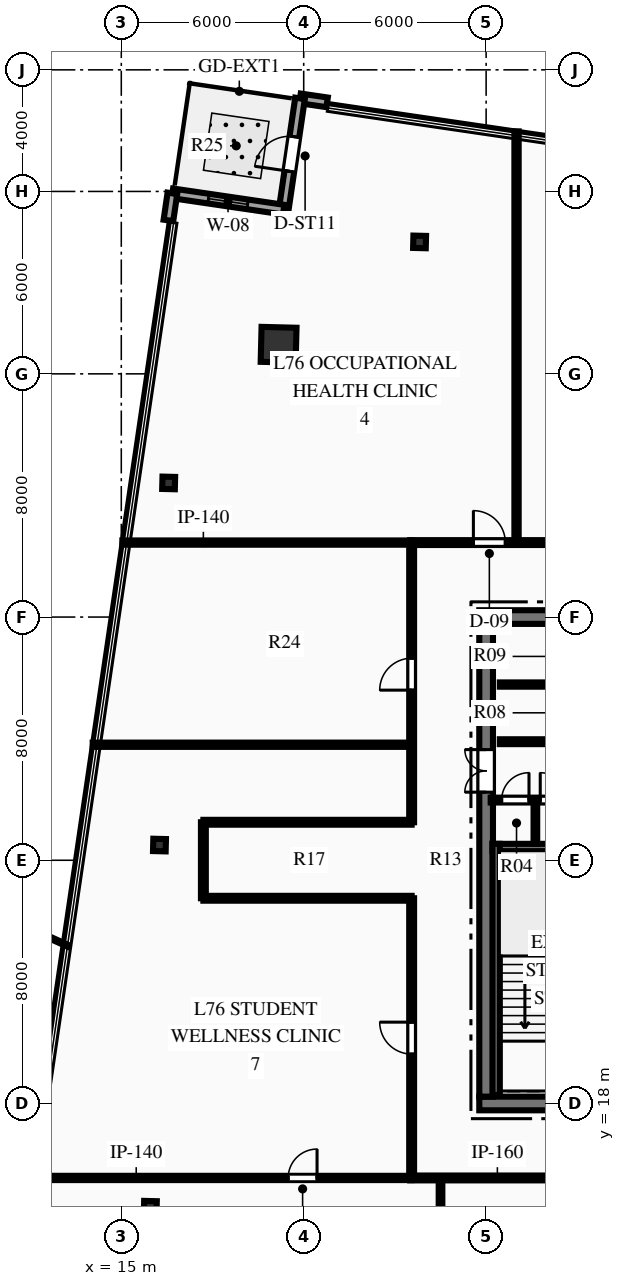
"""IFC4 building model, lengths in metres.
Left out: names, types, materials, properties, quantities, classifications, styles, units other than length and angle.
Written with IfcOpenShell. Run it as: python <this file> out.ifc"""

import sys

from ifc_helpers import new_model, si_unit, direction, frame, frame_2d, origin, origin_2d, place, context, subcontext, project, spatial, rectangle, hollow_rectangle, i_section, extrude, element, fill, save


model = new_model("IFC4")
c1 = context("Model", 3, precision=1e-05, world=origin(), true_north=direction((0.0, 1.0)))
c2 = subcontext(c1, "Body", "Model", "MODEL_VIEW")
j1 = project(units=[si_unit("LENGTHUNIT", "METRE"), si_unit("PLANEANGLEUNIT", "RADIAN")], contexts=[c1])
p1 = place(None, origin())
s1 = spatial("IfcSite", under=j1, at=p1, CompositionType="ELEMENT")
p2 = place(p1, origin())
s2 = spatial("IfcBuilding", under=s1, at=p2, CompositionType="ELEMENT")
p3 = place(p2, frame((0.0, 0.0, 302.7)))
s3 = spatial("IfcBuildingStorey", under=s2, at=p3, CompositionType="ELEMENT", Elevation=302.7)
p4 = place(p3, frame((26.775, 18.0, 0.0), z_axis=(0.0, 0.0, 1.0), x_axis=(1.0, 0.0, 0.0)))
e1 = element("IfcWall", 1, at=p4, inside=s3, PredefinedType="SHEAR", context=c2, shape_type="SweptSolid", body=[
    extrude(rectangle(XDim=18.45, YDim=0.45, at=frame_2d((9.225, 0.0))), origin(), (0.0, 0.0, 1.0), 3.75),
])
p5 = place(p4, frame((7.325, 0.0, 0.0)))
e2 = element("IfcOpeningElement", 2, at=p5, cuts=e1, PredefinedType="OPENING", context=c2, shape_type="SweptSolid", body=[
    extrude(rectangle(XDim=1.1, YDim=2.15, at=frame_2d((0.55, 1.075))), frame((0.0, 0.235, 0.0), z_axis=(0.0, -1.0, 0.0), x_axis=(1.0, 0.0, 0.0)), (0.0, 0.0, 1.0), 0.47),
])
p6 = place(p4, frame((10.025, 0.0, 0.0)))
e3 = element("IfcOpeningElement", 3, at=p6, cuts=e1, PredefinedType="OPENING", context=c2, shape_type="SweptSolid", body=[
    extrude(rectangle(XDim=1.1, YDim=2.15, at=frame_2d((0.55, 1.075))), frame((0.0, 0.235, 0.0), z_axis=(0.0, -1.0, 0.0), x_axis=(1.0, 0.0, 0.0)), (0.0, 0.0, 1.0), 0.47),
])
p7 = place(p3, frame((26.775, 34.0, 0.0), z_axis=(0.0, 0.0, 1.0), x_axis=(1.0, 0.0, 0.0)))
e4 = element("IfcWall", 4, at=p7, inside=s3, PredefinedType="SHEAR", context=c2, shape_type="SweptSolid", body=[
    extrude(rectangle(XDim=18.45, YDim=0.45, at=frame_2d((9.225, 0.0))), origin(), (0.0, 0.0, 1.0), 3.75),
])
p8 = place(p3, frame((27.0, 18.225, 0.0), z_axis=(0.0, 0.0, 1.0), x_axis=(0.0, 1.0, 0.0)))
e5 = element("IfcWall", 5, at=p8, inside=s3, PredefinedType="SHEAR", context=c2, shape_type="SweptSolid", body=[
    extrude(rectangle(XDim=15.55, YDim=0.45, at=frame_2d((7.775, 0.0))), origin(), (0.0, 0.0, 1.0), 3.75),
])
p9 = place(p8, frame((10.015, 0.0, 0.0)))
e6 = element("IfcOpeningElement", 6, at=p9, cuts=e5, PredefinedType="OPENING", context=c2, shape_type="SweptSolid", body=[
    extrude(rectangle(XDim=1.4, YDim=2.2, at=frame_2d((0.7, 1.1))), frame((0.0, 0.235, 0.0), z_axis=(0.0, -1.0, 0.0), x_axis=(1.0, 0.0, 0.0)), (0.0, 0.0, 1.0), 0.47),
])
p10 = place(p3, frame((27.21, 26.42, 0.0), z_axis=(0.0, 0.0, 1.0), x_axis=(1.0, 0.0, 0.0)))
e7 = element("IfcWall", 7, at=p10, inside=s3, PredefinedType="SHEAR", context=c2, shape_type="SweptSolid", body=[
    extrude(rectangle(XDim=3.98, YDim=0.24, at=frame_2d((1.99, 0.0))), origin(), (0.0, 0.0, 1.0), 3.75),
])
p11 = place(p3, frame((27.33, 18.28, 0.0), z_axis=(0.0, 0.0, 1.0), x_axis=(0.0, 1.0, 0.0)))
e8 = element("IfcWall", 8, at=p11, inside=s3, PredefinedType="SHEAR", context=c2, shape_type="SweptSolid", body=[
    extrude(rectangle(XDim=8.26, YDim=0.24, at=frame_2d((4.13, 0.0))), origin(), (0.0, 0.0, 1.0), 3.75),
])
p12 = place(p3, frame((20.174, 42.956, 0.0), z_axis=(0.0, 0.0, 1.0), x_axis=(0.025304572866, 0.999679788028, 0.0)))
e9 = element("IfcColumn", 9, at=p12, inside=s3, PredefinedType="COLUMN", context=c2, shape_type="SweptSolid", body=[
    extrude(hollow_rectangle(XDim=1.15, YDim=1.15, WallThickness=0.05, at=origin_2d()), origin(), (0.0, 0.0, 1.0), 3.75),
])
for number, where, z_axis, x_axis in (
    (10, (24.811, 46.34, 0.0), (0.0, 0.0, 1.0), (0.025, 1.0, 0.0)),
    (11, (16.558, 38.412, 0.0), (0.0, 0.0, 1.0), (0.025, 1.0, 0.0)),
    (12, (16.256, 26.5, 0.0), (0.0, 0.0, 1.0), (0.025, 1.0, 0.0)),
    (13, (15.955, 14.588, 0.0), (0.0, 0.0, 1.0), (0.025, 1.0, 0.0)),
):
    element("IfcColumn", number, at=place(p3, frame(where, z_axis=z_axis, x_axis=x_axis)), inside=s3, PredefinedType="COLUMN", context=c2, shape_type="SweptSolid", body=[
        extrude(i_section(OverallWidth=0.406, OverallDepth=0.416, WebThickness=0.03, FlangeThickness=0.048, at=origin_2d()), origin(), (0.0, 0.0, 1.0), 3.75),
    ])
p13 = place(p3, frame((20.879, 51.062, 0.0), z_axis=(0.0, 0.0, 1.0), x_axis=(0.989410759004, -0.145142516059, 0.0)))
e14 = element("IfcWall", 14, at=p13, inside=s3, PredefinedType="STANDARD", context=c2, shape_type="SweptSolid", body=[
    extrude(rectangle(XDim=0.9, YDim=0.32, at=frame_2d((0.45, 0.0))), origin(), (0.0, 0.0, 1.0), 3.49),
])
p14 = place(p3, frame((20.342, 47.401, 0.0), z_axis=(0.0, 0.0, 1.0), x_axis=(0.145226146725, 0.989398487116, 0.0)))
e15 = element("IfcWall", 15, at=p14, inside=s3, PredefinedType="STANDARD", context=c2, shape_type="SweptSolid", body=[
    extrude(rectangle(XDim=3.7, YDim=0.32, at=frame_2d((1.85, 0.0))), origin(), (0.0, 0.0, 1.0), 3.49),
])
p15 = place(p14, frame((1.275, 0.0, 0.0)))
e16 = element("IfcOpeningElement", 16, at=p15, cuts=e15, PredefinedType="OPENING", context=c2, shape_type="SweptSolid", body=[
    extrude(rectangle(XDim=1.15, YDim=2.2, at=frame_2d((0.575, 1.1))), frame((0.0, 0.17, 0.0), z_axis=(0.0, -1.0, 0.0), x_axis=(1.0, 0.0, 0.0)), (0.0, 0.0, 1.0), 0.34),
])
p16 = place(p3, frame((16.681, 47.938, 0.0), z_axis=(0.0, 0.0, 1.0), x_axis=(0.989398487116, -0.145226146725, 0.0)))
e17 = element("IfcWall", 17, at=p16, inside=s3, PredefinedType="STANDARD", context=c2, shape_type="SweptSolid", body=[
    extrude(rectangle(XDim=3.7, YDim=0.32, at=frame_2d((1.85, 0.0))), origin(), (0.0, 0.0, 1.0), 3.49),
])
p17 = place(p16, frame((1.2, 0.0, 0.85)))
e18 = element("IfcOpeningElement", 18, at=p17, cuts=e17, PredefinedType="OPENING", context=c2, shape_type="SweptSolid", body=[
    extrude(rectangle(XDim=1.3, YDim=1.9, at=frame_2d((0.65, 0.95))), frame((0.0, 0.17, 0.0), z_axis=(0.0, -1.0, 0.0), x_axis=(1.0, 0.0, 0.0)), (0.0, 0.0, 1.0), 0.34),
])
p18 = place(p3, frame((16.55, 47.048, 0.0), z_axis=(0.0, 0.0, 1.0), x_axis=(0.145142516059, 0.989410759004, 0.0)))
e19 = element("IfcWall", 19, at=p18, inside=s3, PredefinedType="STANDARD", context=c2, shape_type="SweptSolid", body=[
    extrude(rectangle(XDim=0.9, YDim=0.32, at=frame_2d((0.45, 0.0))), origin(), (0.0, 0.0, 1.0), 3.49),
])
p19 = place(p3, frame((27.15, 27.98, 0.0), z_axis=(0.0, 0.0, 1.0), x_axis=(1.0, 0.0, 0.0)))
e20 = element("IfcWall", 20, at=p19, inside=s3, PredefinedType="PARTITIONING", context=c2, shape_type="SweptSolid", body=[
    extrude(rectangle(XDim=4.05, YDim=0.16, at=frame_2d((2.025, 0.0))), origin(), (0.0, 0.0, 1.0), 3.49),
])
p20 = place(p19, frame((0.36, 0.0, 0.0)))
e21 = element("IfcOpeningElement", 21, at=p20, cuts=e20, PredefinedType="OPENING", context=c2, shape_type="SweptSolid", body=[
    extrude(rectangle(XDim=0.9, YDim=2.15, at=frame_2d((0.45, 1.075))), frame((0.0, 0.09, 0.0), z_axis=(0.0, -1.0, 0.0), x_axis=(1.0, 0.0, 0.0)), (0.0, 0.0, 1.0), 0.18),
])
p21 = place(p19, frame((1.63, 0.0, 0.0)))
e22 = element("IfcOpeningElement", 22, at=p21, cuts=e20, PredefinedType="OPENING", context=c2, shape_type="SweptSolid", body=[
    extrude(rectangle(XDim=0.9, YDim=2.15, at=frame_2d((0.45, 1.075))), frame((0.0, 0.09, 0.0), z_axis=(0.0, -1.0, 0.0), x_axis=(1.0, 0.0, 0.0)), (0.0, 0.0, 1.0), 0.18),
])
p22 = place(p19, frame((2.788, 0.0, 0.0)))
e23 = element("IfcOpeningElement", 23, at=p22, cuts=e20, PredefinedType="OPENING", context=c2, shape_type="SweptSolid", body=[
    extrude(rectangle(XDim=0.9, YDim=2.15, at=frame_2d((0.45, 1.075))), frame((0.0, 0.09, 0.0), z_axis=(0.0, -1.0, 0.0), x_axis=(1.0, 0.0, 0.0)), (0.0, 0.0, 1.0), 0.18),
])
p23 = place(p3, frame((28.62, 26.54, 0.0), z_axis=(0.0, 0.0, 1.0), x_axis=(0.0, 1.0, 0.0)))
e24 = element("IfcWall", 24, at=p23, inside=s3, PredefinedType="PARTITIONING", context=c2, shape_type="SweptSolid", body=[
    extrude(rectangle(XDim=1.44, YDim=0.12, at=frame_2d((0.72, 0.0))), origin(), (0.0, 0.0, 1.0), 3.49),
])
p24 = place(p3, frame((27.45, 29.9, 0.0), z_axis=(0.0, 0.0, 1.0), x_axis=(1.0, 0.0, 0.0)))
e25 = element("IfcWall", 25, at=p24, inside=s3, PredefinedType="PARTITIONING", context=c2, shape_type="SweptSolid", body=[
    extrude(rectangle(XDim=4.43, YDim=0.16, at=frame_2d((2.215, 0.0))), origin(), (0.0, 0.0, 1.0), 3.49),
])
p25 = place(p24, frame((1.675, 0.0, 0.0)))
e26 = element("IfcOpeningElement", 26, at=p25, cuts=e25, PredefinedType="OPENING", context=c2, shape_type="SweptSolid", body=[
    extrude(rectangle(XDim=0.95, YDim=2.15, at=frame_2d((0.475, 1.075))), frame((0.0, 0.09, 0.0), z_axis=(0.0, -1.0, 0.0), x_axis=(1.0, 0.0, 0.0)), (0.0, 0.0, 1.0), 0.18),
])
p26 = place(p3, frame((27.45, 31.78, 0.0), z_axis=(0.0, 0.0, 1.0), x_axis=(1.0, 0.0, 0.0)))
e27 = element("IfcWall", 27, at=p26, inside=s3, PredefinedType="PARTITIONING", context=c2, shape_type="SweptSolid", body=[
    extrude(rectangle(XDim=4.35, YDim=0.14, at=frame_2d((2.175, 0.0))), origin(), (0.0, 0.0, 1.0), 3.49),
])
p27 = place(p26, frame((1.7, 0.0, 0.0)))
e28 = element("IfcOpeningElement", 28, at=p27, cuts=e27, PredefinedType="OPENING", context=c2, shape_type="SweptSolid", body=[
    extrude(rectangle(XDim=0.9, YDim=2.15, at=frame_2d((0.45, 1.075))), frame((0.0, 0.08, 0.0), z_axis=(0.0, -1.0, 0.0), x_axis=(1.0, 0.0, 0.0)), (0.0, 0.0, 1.0), 0.16),
])
p28 = place(p3, frame((24.5, 15.55, 0.0), z_axis=(0.0, 0.0, 1.0), x_axis=(1.0, 0.0, 0.0)))
e29 = element("IfcWall", 29, at=p28, inside=s3, PredefinedType="PARTITIONING", context=c2, shape_type="SweptSolid", body=[
    extrude(rectangle(XDim=10.25, YDim=0.16, at=frame_2d((5.125, 0.0))), origin(), (0.0, 0.0, 1.0), 3.49),
])
p29 = place(p28, frame((4.675, 0.0, 0.0)))
e30 = element("IfcOpeningElement", 30, at=p29, cuts=e29, PredefinedType="OPENING", context=c2, shape_type="SweptSolid", body=[
    extrude(rectangle(XDim=1.05, YDim=2.15, at=frame_2d((0.525, 1.075))), frame((0.0, 0.09, 0.0), z_axis=(0.0, -1.0, 0.0), x_axis=(1.0, 0.0, 0.0)), (0.0, 0.0, 1.0), 0.18),
])
p30 = place(p3, frame((24.5, 36.45, 0.0), z_axis=(0.0, 0.0, 1.0), x_axis=(1.0, 0.0, 0.0)))
e31 = element("IfcWall", 31, at=p30, inside=s3, PredefinedType="PARTITIONING", context=c2, shape_type="SweptSolid", body=[
    extrude(rectangle(XDim=10.25, YDim=0.16, at=frame_2d((5.125, 0.0))), origin(), (0.0, 0.0, 1.0), 3.49),
])
p31 = place(p30, frame((2.081, 0.0, 0.0)))
e32 = element("IfcOpeningElement", 32, at=p31, cuts=e31, PredefinedType="OPENING", context=c2, shape_type="SweptSolid", body=[
    extrude(rectangle(XDim=1.05, YDim=2.15, at=frame_2d((0.525, 1.075))), frame((0.0, 0.09, 0.0), z_axis=(0.0, -1.0, 0.0), x_axis=(1.0, 0.0, 0.0)), (0.0, 0.0, 1.0), 0.18),
])
p32 = place(p30, frame((5.334, 0.0, 0.0)))
e33 = element("IfcOpeningElement", 33, at=p32, cuts=e31, PredefinedType="OPENING", context=c2, shape_type="SweptSolid", body=[
    extrude(rectangle(XDim=1.05, YDim=2.15, at=frame_2d((0.525, 1.075))), frame((0.0, 0.09, 0.0), z_axis=(0.0, -1.0, 0.0), x_axis=(1.0, 0.0, 0.0)), (0.0, 0.0, 1.0), 0.18),
])
p33 = place(p3, frame((24.55, 15.55, 0.0), z_axis=(0.0, 0.0, 1.0), x_axis=(0.0, 1.0, 0.0)))
e34 = element("IfcWall", 34, at=p33, inside=s3, PredefinedType="PARTITIONING", context=c2, shape_type="SweptSolid", body=[
    extrude(rectangle(XDim=9.2, YDim=0.16, at=frame_2d((4.6, 0.0))), origin(), (0.0, 0.0, 1.0), 3.49),
])
p34 = place(p33, frame((4.075, 0.0, 0.0)))
e35 = element("IfcOpeningElement", 35, at=p34, cuts=e34, PredefinedType="OPENING", context=c2, shape_type="SweptSolid", body=[
    extrude(rectangle(XDim=1.05, YDim=2.15, at=frame_2d((0.525, 1.075))), frame((0.0, 0.09, 0.0), z_axis=(0.0, -1.0, 0.0), x_axis=(1.0, 0.0, 0.0)), (0.0, 0.0, 1.0), 0.18),
])
p35 = place(p3, frame((24.55, 27.25, 0.0), z_axis=(0.0, 0.0, 1.0), x_axis=(0.0, 1.0, 0.0)))
e36 = element("IfcWall", 36, at=p35, inside=s3, PredefinedType="PARTITIONING", context=c2, shape_type="SweptSolid", body=[
    extrude(rectangle(XDim=9.2, YDim=0.16, at=frame_2d((4.6, 0.0))), origin(), (0.0, 0.0, 1.0), 3.49),
])
p36 = place(p35, frame((4.346, 0.0, 0.0)))
e37 = element("IfcOpeningElement", 37, at=p36, cuts=e36, PredefinedType="OPENING", context=c2, shape_type="SweptSolid", body=[
    extrude(rectangle(XDim=1.05, YDim=2.15, at=frame_2d((0.525, 1.075))), frame((0.0, 0.09, 0.0), z_axis=(0.0, -1.0, 0.0), x_axis=(1.0, 0.0, 0.0)), (0.0, 0.0, 1.0), 0.18),
])
for number, where, z_axis, x_axis in (
    (38, (17.7, 24.75, 0.0), (0.0, 0.0, 1.0), (1.0, 0.0, 0.0)),
    (39, (17.7, 27.25, 0.0), (0.0, 0.0, 1.0), (1.0, 0.0, 0.0)),
):
    element("IfcWall", number, at=place(p3, frame(where, z_axis=z_axis, x_axis=x_axis)), inside=s3, PredefinedType="PARTITIONING", context=c2, shape_type="SweptSolid", body=[
        extrude(rectangle(XDim=6.85, YDim=0.16, at=frame_2d((3.425, 0.0))), origin(), (0.0, 0.0, 1.0), 3.49),
    ])
p37 = place(p3, frame((17.7, 24.75, 0.0), z_axis=(0.0, 0.0, 1.0), x_axis=(0.0, 1.0, 0.0)))
e40 = element("IfcWall", 40, at=p37, inside=s3, PredefinedType="PARTITIONING", context=c2, shape_type="SweptSolid", body=[
    extrude(rectangle(XDim=2.5, YDim=0.16, at=frame_2d((1.25, 0.0))), origin(), (0.0, 0.0, 1.0), 3.49),
])
p38 = place(p3, frame((11.968, 15.55, 0.0), z_axis=(0.0, 0.0, 1.0), x_axis=(1.0, 0.0, 0.0)))
e41 = element("IfcWall", 41, at=p38, inside=s3, PredefinedType="PARTITIONING", context=c2, shape_type="SweptSolid", body=[
    extrude(rectangle(XDim=12.582, YDim=0.14, at=frame_2d((6.291, 0.0))), origin(), (0.0, 0.0, 1.0), 3.079),
])
p39 = place(p38, frame((8.521, 0.0, 0.0)))
e42 = element("IfcOpeningElement", 42, at=p39, cuts=e41, PredefinedType="OPENING", context=c2, shape_type="SweptSolid", body=[
    extrude(rectangle(XDim=0.95, YDim=2.15, at=frame_2d((0.475, 1.075))), frame((0.0, 0.08, 0.0), z_axis=(0.0, -1.0, 0.0), x_axis=(1.0, 0.0, 0.0)), (0.0, 0.0, 1.0), 0.16),
])
p40 = place(p3, frame((15.035, 36.45, 0.0), z_axis=(0.0, 0.0, 1.0), x_axis=(1.0, 0.0, 0.0)))
e43 = element("IfcWall", 43, at=p40, inside=s3, PredefinedType="PARTITIONING", context=c2, shape_type="SweptSolid", body=[
    extrude(rectangle(XDim=9.515, YDim=0.14, at=frame_2d((4.757, 0.0))), origin(), (0.0, 0.0, 1.0), 2.868),
])
p41 = place(p3, frame((25.5, 4.74, 0.0), z_axis=(0.0, 0.0, 1.0), x_axis=(0.0, 1.0, 0.0)))
e44 = element("IfcWall", 44, at=p41, inside=s3, PredefinedType="PARTITIONING", context=c2, shape_type="SweptSolid", body=[
    extrude(rectangle(XDim=10.811, YDim=0.12, at=frame_2d((5.405, 0.0))), origin(), (0.0, 0.0, 1.0), 2.868),
])
p42 = place(p3, frame((28.0, 36.45, 0.0), z_axis=(0.0, 0.0, 1.0), x_axis=(0.0, 1.0, 0.0)))
e45 = element("IfcWall", 45, at=p42, inside=s3, PredefinedType="PARTITIONING", context=c2, shape_type="SweptSolid", body=[
    extrude(rectangle(XDim=13.526, YDim=0.14, at=frame_2d((6.763, 0.0))), origin(), (0.0, 0.0, 1.0), 3.49),
])
p43 = place(p3, frame((14.059, 29.8, 0.0), z_axis=(0.0, 0.0, 1.0), x_axis=(1.0, 0.0, 0.0)))
e46 = element("IfcWall", 46, at=p43, inside=s3, PredefinedType="PARTITIONING", context=c2, shape_type="SweptSolid", body=[
    extrude(rectangle(XDim=10.491, YDim=0.14, at=frame_2d((5.246, 0.0))), origin(), (0.0, 0.0, 1.0), 3.49),
])
p44 = place(p15, origin())
e47 = element("IfcDoor", 47, at=p44, inside=s3, OperationType="SINGLE_SWING_LEFT", PredefinedType="DOOR", context=c2, shape_type="SweptSolid", body=[
    extrude(rectangle(XDim=1.15, YDim=2.2, at=frame_2d((0.575, 1.1))), frame((0.0, 0.025, 0.0), z_axis=(0.0, -1.0, 0.0), x_axis=(1.0, 0.0, 0.0)), (0.0, 0.0, 1.0), 0.05),
])
fill(e16, e47)
p45 = place(p17, origin())
e48 = element("IfcWindow", 48, at=p45, inside=s3, PartitioningType="SINGLE_PANEL", PredefinedType="WINDOW", context=c2, shape_type="SweptSolid", body=[
    extrude(rectangle(XDim=1.3, YDim=1.9, at=frame_2d((0.65, 0.95))), frame((0.0, 0.03, 0.0), z_axis=(0.0, -1.0, 0.0), x_axis=(1.0, 0.0, 0.0)), (0.0, 0.0, 1.0), 0.06),
])
fill(e18, e48)
p46 = place(p20, origin())
e49 = element("IfcDoor", 49, at=p46, inside=s3, OperationType="SINGLE_SWING_RIGHT", PredefinedType="DOOR", context=c2, shape_type="SweptSolid", body=[
    extrude(rectangle(XDim=0.9, YDim=2.15, at=frame_2d((0.45, 1.075))), frame((0.0, 0.025, 0.0), z_axis=(0.0, -1.0, 0.0), x_axis=(1.0, 0.0, 0.0)), (0.0, 0.0, 1.0), 0.05),
])
fill(e21, e49)
p47 = place(p21, origin())
e50 = element("IfcDoor", 50, at=p47, inside=s3, OperationType="SINGLE_SWING_LEFT", PredefinedType="DOOR", context=c2, shape_type="SweptSolid", body=[
    extrude(rectangle(XDim=0.9, YDim=2.15, at=frame_2d((0.45, 1.075))), frame((0.0, 0.025, 0.0), z_axis=(0.0, -1.0, 0.0), x_axis=(1.0, 0.0, 0.0)), (0.0, 0.0, 1.0), 0.05),
])
fill(e22, e50)
p48 = place(p9, origin())
e51 = element("IfcDoor", 51, at=p48, inside=s3, OperationType="DOUBLE_DOOR_SINGLE_SWING", PredefinedType="DOOR", context=c2, shape_type="SweptSolid", body=[
    extrude(rectangle(XDim=1.4, YDim=2.2, at=frame_2d((0.7, 1.1))), frame((0.0, 0.025, 0.0), z_axis=(0.0, -1.0, 0.0), x_axis=(1.0, 0.0, 0.0)), (0.0, 0.0, 1.0), 0.05),
])
fill(e6, e51)
p49 = place(p39, origin())
e52 = element("IfcDoor", 52, at=p49, inside=s3, OperationType="SINGLE_SWING_RIGHT", PredefinedType="DOOR", context=c2, shape_type="SweptSolid", body=[
    extrude(rectangle(XDim=0.95, YDim=2.15, at=frame_2d((0.475, 1.075))), frame((0.0, 0.025, 0.0), z_axis=(0.0, -1.0, 0.0), x_axis=(1.0, 0.0, 0.0)), (0.0, 0.0, 1.0), 0.05),
])
fill(e42, e52)
p50 = place(p31, origin())
e53 = element("IfcDoor", 53, at=p50, inside=s3, OperationType="SINGLE_SWING_LEFT", PredefinedType="DOOR", context=c2, shape_type="SweptSolid", body=[
    extrude(rectangle(XDim=1.05, YDim=2.15, at=frame_2d((0.525, 1.075))), frame((0.0, 0.025, 0.0), z_axis=(0.0, -1.0, 0.0), x_axis=(1.0, 0.0, 0.0)), (0.0, 0.0, 1.0), 0.05),
])
fill(e32, e53)
p51 = place(p34, origin())
e54 = element("IfcDoor", 54, at=p51, inside=s3, OperationType="SINGLE_SWING_RIGHT", PredefinedType="DOOR", context=c2, shape_type="SweptSolid", body=[
    extrude(rectangle(XDim=1.05, YDim=2.15, at=frame_2d((0.525, 1.075))), frame((0.0, 0.025, 0.0), z_axis=(0.0, -1.0, 0.0), x_axis=(1.0, 0.0, 0.0)), (0.0, 0.0, 1.0), 0.05),
])
fill(e35, e54)
p52 = place(p36, origin())
e55 = element("IfcDoor", 55, at=p52, inside=s3, OperationType="SINGLE_SWING_LEFT", PredefinedType="DOOR", context=c2, shape_type="SweptSolid", body=[
    extrude(rectangle(XDim=1.05, YDim=2.15, at=frame_2d((0.525, 1.075))), frame((0.0, 0.025, 0.0), z_axis=(0.0, -1.0, 0.0), x_axis=(1.0, 0.0, 0.0)), (0.0, 0.0, 1.0), 0.05),
])
fill(e37, e55)
save(model, sys.argv[1])
